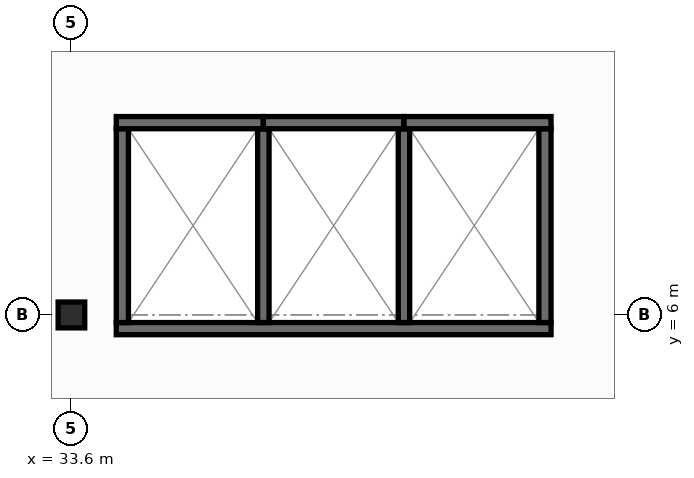
"""IFC4 building model, lengths in metres.
Left out: names, types, materials, properties, quantities, classifications, styles, units other than length and angle.
Written with IfcOpenShell. Run it as: python <this file> out.ifc"""

import sys

from ifc_helpers import new_model, si_unit, direction, frame, frame_2d, origin, origin_2d, place, context, subcontext, project, spatial, rectangle, i_section, extrude, element, save


model = new_model("IFC4")
c1 = context("Model", 3, precision=1e-05, world=origin(), true_north=direction((0.0, 1.0)))
c2 = subcontext(c1, "Body", "Model", "MODEL_VIEW")
j1 = project(units=[si_unit("LENGTHUNIT", "METRE"), si_unit("PLANEANGLEUNIT", "RADIAN")], contexts=[c1])
p1 = place(None, origin())
s1 = spatial("IfcSite", under=j1, at=p1, CompositionType="ELEMENT")
p2 = place(p1, origin())
s2 = spatial("IfcBuilding", under=s1, at=p2, CompositionType="ELEMENT")
p3 = place(p2, frame((0.0, 0.0, 42.25)))
s3 = spatial("IfcBuildingStorey", under=s2, at=p3, CompositionType="ELEMENT", Elevation=42.25)
p4 = place(p3, frame((33.6, 6.0, 0.0), z_axis=(0.0, 0.0, 1.0), x_axis=(1.0, 0.0, 0.0)))
e1 = element("IfcColumn", 1, at=p4, inside=s3, PredefinedType="COLUMN", context=c2, shape_type="SweptSolid", body=[
    extrude(i_section(OverallWidth=0.35, OverallDepth=0.34, WebThickness=0.016, FlangeThickness=0.028, at=origin_2d()), origin(), (0.0, 0.0, 1.0), 3.95),
])
p5 = place(p3, frame((34.19, 5.82, 0.0), z_axis=(0.0, 0.0, 1.0), x_axis=(1.0, 0.0, 0.0)))
e2 = element("IfcWall", 2, at=p5, inside=s3, PredefinedType="SHEAR", context=c2, shape_type="SweptSolid", body=[
    extrude(rectangle(XDim=5.72, YDim=0.16, at=frame_2d((2.86, 0.0))), origin(), (0.0, 0.0, 1.0), 3.71),
])
for number, where, z_axis, x_axis in (
    (3, (34.27, 5.9, 0.0), (0.0, 0.0, 1.0), (0.0, 1.0, 0.0)),
    (4, (39.83, 5.9, 0.0), (0.0, 0.0, 1.0), (0.0, 1.0, 0.0)),
):
    element("IfcWall", number, at=place(p3, frame(where, z_axis=z_axis, x_axis=x_axis)), inside=s3, PredefinedType="SHEAR", context=c2, shape_type="SweptSolid", body=[
        extrude(rectangle(XDim=2.55, YDim=0.16, at=frame_2d((1.275, 0.0))), origin(), (0.0, 0.0, 1.0), 3.71),
    ])
for number, where, z_axis, x_axis in (
    (5, (36.125, 5.9, 0.0), (0.0, 0.0, 1.0), (0.0, 1.0, 0.0)),
    (6, (37.975, 5.9, 0.0), (0.0, 0.0, 1.0), (0.0, 1.0, 0.0)),
):
    element("IfcWall", number, at=place(p3, frame(where, z_axis=z_axis, x_axis=x_axis)), inside=s3, PredefinedType="SHEAR", context=c2, shape_type="SweptSolid", body=[
        extrude(rectangle(XDim=2.55, YDim=0.15, at=frame_2d((1.275, 0.0))), origin(), (0.0, 0.0, 1.0), 3.71),
    ])
p6 = place(p3, frame((34.19, 8.53, 0.0), z_axis=(0.0, 0.0, 1.0), x_axis=(1.0, 0.0, 0.0)))
e7 = element("IfcWall", 7, at=p6, inside=s3, PredefinedType="SHEAR", context=c2, shape_type="SweptSolid", body=[
    extrude(rectangle(XDim=1.935, YDim=0.16, at=frame_2d((0.968, 0.0))), origin(), (0.0, 0.0, 1.0), 3.71),
])
p7 = place(p3, frame((36.125, 8.53, 0.0), z_axis=(0.0, 0.0, 1.0), x_axis=(1.0, 0.0, 0.0)))
e8 = element("IfcWall", 8, at=p7, inside=s3, PredefinedType="SHEAR", context=c2, shape_type="SweptSolid", body=[
    extrude(rectangle(XDim=1.85, YDim=0.16, at=frame_2d((0.925, 0.0))), origin(), (0.0, 0.0, 1.0), 3.71),
])
p8 = place(p3, frame((37.975, 8.53, 0.0), z_axis=(0.0, 0.0, 1.0), x_axis=(1.0, 0.0, 0.0)))
e9 = element("IfcWall", 9, at=p8, inside=s3, PredefinedType="SHEAR", context=c2, shape_type="SweptSolid", body=[
    extrude(rectangle(XDim=1.935, YDim=0.16, at=frame_2d((0.967, 0.0))), origin(), (0.0, 0.0, 1.0), 3.71),
])
save(model, sys.argv[1])
